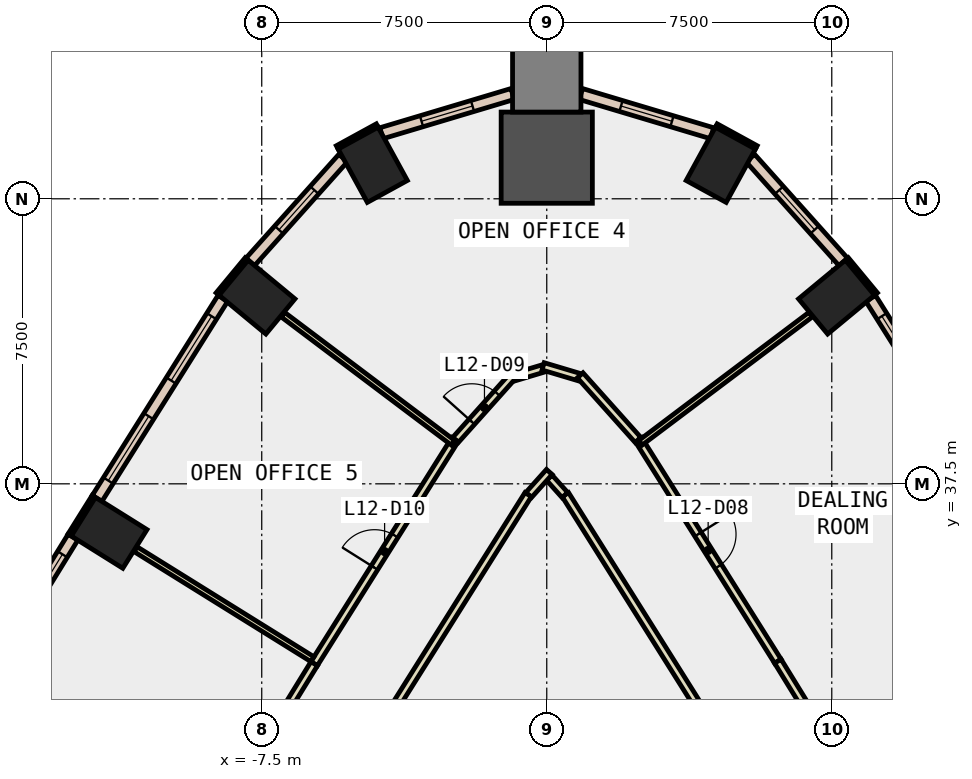
"""IFC4 building model, lengths in metres.
Left out: names, types, materials, properties, quantities, classifications, styles, units other than length and angle.
Written with IfcOpenShell. Run it as: python <this file> out.ifc"""

import sys

from ifc_helpers import new_model, si_unit, direction, frame, frame_2d, origin, origin_2d, place, context, subcontext, project, spatial, rectangle, extrude, element, fill, save


model = new_model("IFC4")
c1 = context("Model", 3, precision=1e-05, world=origin(), true_north=direction((0.0, 1.0)))
c2 = subcontext(c1, "Body", "Model", "MODEL_VIEW")
j1 = project(units=[si_unit("LENGTHUNIT", "METRE"), si_unit("PLANEANGLEUNIT", "RADIAN")], contexts=[c1])
p1 = place(None, origin())
s1 = spatial("IfcSite", under=j1, at=p1, CompositionType="ELEMENT")
p2 = place(p1, origin())
s2 = spatial("IfcBuilding", under=s1, at=p2, CompositionType="ELEMENT")
p3 = place(p2, frame((0.0, 0.0, 60.2)))
s3 = spatial("IfcBuildingStorey", under=s2, at=p3, CompositionType="ELEMENT", Elevation=60.2)
for number, where, z_axis, x_axis in (
    (1, (7.625, 42.414, -0.4), (0.0, 0.0, 1.0), (-0.638, 0.77, 0.0)),
    (2, (4.579, 45.895, -0.4), (0.0, 0.0, 1.0), (-0.877, 0.48, 0.0)),
):
    element("IfcColumn", number, at=place(p3, frame(where, z_axis=z_axis, x_axis=x_axis)), inside=s3, PredefinedType="COLUMN", context=c2, shape_type="SweptSolid", body=[
        extrude(rectangle(XDim=1.2, YDim=1.6, at=origin_2d()), origin(), (0.0, 0.0, 1.0), 4.2),
    ])
p4 = place(p3, frame((0.0, 46.082, -0.4), z_axis=(0.0, 0.0, 1.0), x_axis=(0.0, 1.0, 0.0)))
e3 = element("IfcColumn", 3, at=p4, inside=s3, PredefinedType="COLUMN", context=c2, shape_type="SweptSolid", body=[
    extrude(rectangle(XDim=2.4, YDim=2.4, at=origin_2d()), origin(), (0.0, 0.0, 1.0), 4.2),
])
for number, where, z_axis, x_axis in (
    (4, (-4.579, 45.895, -0.4), (0.0, 0.0, 1.0), (0.877, 0.48, 0.0)),
    (5, (-7.625, 42.414, -0.4), (0.0, 0.0, 1.0), (0.638, 0.77, 0.0)),
    (6, (-11.516, 36.211, -0.4), (0.0, 0.0, 1.0), (0.53, 0.848, 0.0)),
):
    element("IfcColumn", number, at=place(p3, frame(where, z_axis=z_axis, x_axis=x_axis)), inside=s3, PredefinedType="COLUMN", context=c2, shape_type="SweptSolid", body=[
        extrude(rectangle(XDim=1.2, YDim=1.6, at=origin_2d()), origin(), (0.0, 0.0, 1.0), 4.2),
    ])
p5 = place(p3, frame((0.0, 48.182, -0.4), z_axis=(0.0, 0.0, 1.0), x_axis=(0.0, 1.0, 0.0)))
e7 = element("IfcColumn", 7, at=p5, inside=s3, PredefinedType="COLUMN", context=c2, shape_type="SweptSolid", body=[
    extrude(rectangle(XDim=1.8, YDim=1.8, at=origin_2d()), origin(), (0.0, 0.0, 1.0), 4.2),
])
for number, where, z_axis, x_axis in (
    (8, (5.513, 46.352, 0.0), (0.0, 0.0, 1.0), (-0.877, 0.48, 0.0)),
    (9, (-4.461, 46.928, 0.0), (0.0, 0.0, 1.0), (-0.877, -0.48, 0.0)),
):
    element("IfcWall", number, at=place(p3, frame(where, z_axis=z_axis, x_axis=x_axis)), inside=s3, PredefinedType="STANDARD", context=c2, shape_type="SweptSolid", body=[
        extrude(rectangle(XDim=1.199, YDim=0.1, at=frame_2d((0.6, 0.0))), origin(), (0.0, 0.0, 1.0), 3.8),
    ])
for number, where, z_axis, x_axis in (
    (10, (8.662, 42.494, 0.0), (0.0, 0.0, 1.0), (-0.638, 0.77, 0.0)),
    (11, (-7.897, 43.418, 0.0), (0.0, 0.0, 1.0), (-0.638, -0.77, 0.0)),
):
    element("IfcWall", number, at=place(p3, frame(where, z_axis=z_axis, x_axis=x_axis)), inside=s3, PredefinedType="STANDARD", context=c2, shape_type="SweptSolid", body=[
        extrude(rectangle(XDim=1.2, YDim=0.1, at=frame_2d((0.6, 0.0))), origin(), (0.0, 0.0, 1.0), 3.8),
    ])
p6 = place(p3, frame((-11.919, 37.17, 0.0), z_axis=(0.0, 0.0, 1.0), x_axis=(-0.530273374944, -0.847826720401, 0.0)))
e12 = element("IfcWall", 12, at=p6, inside=s3, PredefinedType="STANDARD", context=c2, shape_type="SweptSolid", body=[
    extrude(rectangle(XDim=1.199, YDim=0.1, at=frame_2d((0.6, 0.0))), origin(), (0.0, 0.0, 1.0), 3.8),
])
p7 = place(p3, frame((11.833, 37.116, 0.0), z_axis=(0.0, 0.0, 1.0), x_axis=(-0.532322705893, 0.846541515102, 0.0)))
e13 = element("IfcWall", 13, at=p7, inside=s3, PredefinedType="STANDARD", context=c2, shape_type="SweptSolid", body=[
    extrude(rectangle(XDim=6.218, YDim=0.3, at=frame_2d((3.109, 0.0))), origin(), (0.0, 0.0, 1.0), 3.8),
])
p8 = place(p7, frame((0.555, 0.0, 0.9)))
e14 = element("IfcOpeningElement", 14, at=p8, cuts=e13, PredefinedType="OPENING", context=c2, shape_type="SweptSolid", body=[
    extrude(rectangle(XDim=2.0, YDim=2.6, at=frame_2d((1.0, 1.3))), frame((0.0, 0.16, 0.0), z_axis=(0.0, -1.0, 0.0), x_axis=(1.0, 0.0, 0.0)), (0.0, 0.0, 1.0), 0.32),
])
p9 = place(p7, frame((3.664, 0.0, 0.9)))
e15 = element("IfcOpeningElement", 15, at=p9, cuts=e13, PredefinedType="OPENING", context=c2, shape_type="SweptSolid", body=[
    extrude(rectangle(XDim=2.0, YDim=2.6, at=frame_2d((1.0, 1.3))), frame((0.0, 0.16, 0.0), z_axis=(0.0, -1.0, 0.0), x_axis=(1.0, 0.0, 0.0)), (0.0, 0.0, 1.0), 0.32),
])
p10 = place(p3, frame((7.803, 43.339, 0.0), z_axis=(0.0, 0.0, 1.0), x_axis=(-0.666901909312, 0.745145518242, 0.0)))
e16 = element("IfcWall", 16, at=p10, inside=s3, PredefinedType="STANDARD", context=c2, shape_type="SweptSolid", body=[
    extrude(rectangle(XDim=3.666, YDim=0.3, at=frame_2d((1.833, 0.0))), origin(), (0.0, 0.0, 1.0), 3.8),
])
p11 = place(p10, frame((1.133, 0.0, 0.9)))
e17 = element("IfcOpeningElement", 17, at=p11, cuts=e16, PredefinedType="OPENING", context=c2, shape_type="SweptSolid", body=[
    extrude(rectangle(XDim=1.4, YDim=2.6, at=frame_2d((0.7, 1.3))), frame((0.0, 0.16, 0.0), z_axis=(0.0, -1.0, 0.0), x_axis=(1.0, 0.0, 0.0)), (0.0, 0.0, 1.0), 0.32),
])
p12 = place(p3, frame((4.35, 46.725, 0.0), z_axis=(0.0, 0.0, 1.0), x_axis=(-0.958083325779, 0.286489687186, 0.0)))
e18 = element("IfcWall", 18, at=p12, inside=s3, PredefinedType="STANDARD", context=c2, shape_type="SweptSolid", body=[
    extrude(rectangle(XDim=3.602, YDim=0.3, at=frame_2d((1.801, 0.0))), origin(), (0.0, 0.0, 1.0), 3.8),
])
p13 = place(p12, frame((1.101, 0.0, 0.9)))
e19 = element("IfcOpeningElement", 19, at=p13, cuts=e18, PredefinedType="OPENING", context=c2, shape_type="SweptSolid", body=[
    extrude(rectangle(XDim=1.4, YDim=2.6, at=frame_2d((0.7, 1.3))), frame((0.0, 0.16, 0.0), z_axis=(0.0, -1.0, 0.0), x_axis=(1.0, 0.0, 0.0)), (0.0, 0.0, 1.0), 0.32),
])
p14 = place(p3, frame((-0.899, 47.757, 0.0), z_axis=(0.0, 0.0, 1.0), x_axis=(-0.958083325779, -0.286489687186, 0.0)))
e20 = element("IfcWall", 20, at=p14, inside=s3, PredefinedType="STANDARD", context=c2, shape_type="SweptSolid", body=[
    extrude(rectangle(XDim=3.602, YDim=0.3, at=frame_2d((1.801, 0.0))), origin(), (0.0, 0.0, 1.0), 3.8),
])
p15 = place(p14, frame((1.101, 0.0, 0.9)))
e21 = element("IfcOpeningElement", 21, at=p15, cuts=e20, PredefinedType="OPENING", context=c2, shape_type="SweptSolid", body=[
    extrude(rectangle(XDim=1.4, YDim=2.6, at=frame_2d((0.7, 1.3))), frame((0.0, 0.16, 0.0), z_axis=(0.0, -1.0, 0.0), x_axis=(1.0, 0.0, 0.0)), (0.0, 0.0, 1.0), 0.32),
])
p16 = place(p3, frame((-5.358, 46.071, 0.0), z_axis=(0.0, 0.0, 1.0), x_axis=(-0.666901909312, -0.745145518242, 0.0)))
e22 = element("IfcWall", 22, at=p16, inside=s3, PredefinedType="STANDARD", context=c2, shape_type="SweptSolid", body=[
    extrude(rectangle(XDim=3.666, YDim=0.3, at=frame_2d((1.833, 0.0))), origin(), (0.0, 0.0, 1.0), 3.8),
])
p17 = place(p16, frame((1.133, 0.0, 0.9)))
e23 = element("IfcOpeningElement", 23, at=p17, cuts=e22, PredefinedType="OPENING", context=c2, shape_type="SweptSolid", body=[
    extrude(rectangle(XDim=1.4, YDim=2.6, at=frame_2d((0.7, 1.3))), frame((0.0, 0.16, 0.0), z_axis=(0.0, -1.0, 0.0), x_axis=(1.0, 0.0, 0.0)), (0.0, 0.0, 1.0), 0.32),
])
p18 = place(p3, frame((-8.523, 42.38, 0.0), z_axis=(0.0, 0.0, 1.0), x_axis=(-0.532322705893, -0.846541515102, 0.0)))
e24 = element("IfcWall", 24, at=p18, inside=s3, PredefinedType="STANDARD", context=c2, shape_type="SweptSolid", body=[
    extrude(rectangle(XDim=6.218, YDim=0.3, at=frame_2d((3.109, 0.0))), origin(), (0.0, 0.0, 1.0), 3.8),
])
p19 = place(p18, frame((0.555, 0.0, 0.9)))
e25 = element("IfcOpeningElement", 25, at=p19, cuts=e24, PredefinedType="OPENING", context=c2, shape_type="SweptSolid", body=[
    extrude(rectangle(XDim=2.0, YDim=2.6, at=frame_2d((1.0, 1.3))), frame((0.0, 0.16, 0.0), z_axis=(0.0, -1.0, 0.0), x_axis=(1.0, 0.0, 0.0)), (0.0, 0.0, 1.0), 0.32),
])
p20 = place(p18, frame((3.664, 0.0, 0.9)))
e26 = element("IfcOpeningElement", 26, at=p20, cuts=e24, PredefinedType="OPENING", context=c2, shape_type="SweptSolid", body=[
    extrude(rectangle(XDim=2.0, YDim=2.6, at=frame_2d((1.0, 1.3))), frame((0.0, 0.16, 0.0), z_axis=(0.0, -1.0, 0.0), x_axis=(1.0, 0.0, 0.0)), (0.0, 0.0, 1.0), 0.32),
])
p21 = place(p3, frame((-12.466, 36.098, 0.0), z_axis=(0.0, 0.0, 1.0), x_axis=(-0.524239751329, -0.851570715282, 0.0)))
e27 = element("IfcWall", 27, at=p21, inside=s3, PredefinedType="STANDARD", context=c2, shape_type="SweptSolid", body=[
    extrude(rectangle(XDim=6.125, YDim=0.3, at=frame_2d((3.062, 0.0))), origin(), (0.0, 0.0, 1.0), 3.8),
])
p22 = place(p21, frame((0.531, 0.0, 0.9)))
e28 = element("IfcOpeningElement", 28, at=p22, cuts=e27, PredefinedType="OPENING", context=c2, shape_type="SweptSolid", body=[
    extrude(rectangle(XDim=2.0, YDim=2.6, at=frame_2d((1.0, 1.3))), frame((0.0, 0.16, 0.0), z_axis=(0.0, -1.0, 0.0), x_axis=(1.0, 0.0, 0.0)), (0.0, 0.0, 1.0), 0.32),
])
p23 = place(p21, frame((3.594, 0.0, 0.9)))
e29 = element("IfcOpeningElement", 29, at=p23, cuts=e27, PredefinedType="OPENING", context=c2, shape_type="SweptSolid", body=[
    extrude(rectangle(XDim=2.0, YDim=2.6, at=frame_2d((1.0, 1.3))), frame((0.0, 0.16, 0.0), z_axis=(0.0, -1.0, 0.0), x_axis=(1.0, 0.0, 0.0)), (0.0, 0.0, 1.0), 0.32),
])
p24 = place(p3, frame((4.043, 31.564, 0.0), z_axis=(0.0, 0.0, 1.0), x_axis=(-0.532301094997, 0.846555104092, 0.0)))
e30 = element("IfcWall", 30, at=p24, inside=s3, PredefinedType="PARTITIONING", context=c2, shape_type="SweptSolid", body=[
    extrude(rectangle(XDim=6.677, YDim=0.2, at=frame_2d((3.338, 0.0))), origin(), (0.0, 0.0, 1.0), 3.8),
])
p25 = place(p3, frame((0.476, 37.206, 0.0), z_axis=(0.0, 0.0, 1.0), x_axis=(-0.667027496744, 0.745033098988, 0.0)))
e31 = element("IfcWall", 31, at=p25, inside=s3, PredefinedType="PARTITIONING", context=c2, shape_type="SweptSolid", body=[
    extrude(rectangle(XDim=0.614, YDim=0.2, at=frame_2d((0.307, 0.0))), origin(), (0.0, 0.0, 1.0), 3.8),
])
p26 = place(p3, frame((0.067, 37.812, 0.0), z_axis=(0.0, 0.0, 1.0), x_axis=(-0.667338487106, -0.744754552606, 0.0)))
e32 = element("IfcWall", 32, at=p26, inside=s3, PredefinedType="PARTITIONING", context=c2, shape_type="SweptSolid", body=[
    extrude(rectangle(XDim=0.814, YDim=0.2, at=frame_2d((0.407, 0.0))), origin(), (0.0, 0.0, 1.0), 3.8),
])
p27 = place(p3, frame((-0.489, 37.216, 0.0), z_axis=(0.0, 0.0, 1.0), x_axis=(-0.532301094997, -0.846555104092, 0.0)))
e33 = element("IfcWall", 33, at=p27, inside=s3, PredefinedType="PARTITIONING", context=c2, shape_type="SweptSolid", body=[
    extrude(rectangle(XDim=6.677, YDim=0.2, at=frame_2d((3.338, 0.0))), origin(), (0.0, 0.0, 1.0), 3.8),
])
p28 = place(p3, frame((2.413, 38.665, 0.0), z_axis=(0.0, 0.0, 1.0), x_axis=(0.532328273879, -0.846538013812, 0.0)))
e34 = element("IfcWall", 34, at=p28, inside=s3, PredefinedType="PARTITIONING", context=c2, shape_type="SweptSolid", body=[
    extrude(rectangle(XDim=6.89, YDim=0.2, at=frame_2d((3.445, 0.0))), origin(), (0.0, 0.0, 1.0), 3.8),
])
p29 = place(p28, frame((2.945, 0.0, 0.0)))
e35 = element("IfcOpeningElement", 35, at=p29, cuts=e34, PredefinedType="OPENING", context=c2, shape_type="SweptSolid", body=[
    extrude(rectangle(XDim=1.0, YDim=2.1, at=frame_2d((0.5, 1.05))), frame((0.0, 0.11, 0.0), z_axis=(0.0, -1.0, 0.0), x_axis=(1.0, 0.0, 0.0)), (0.0, 0.0, 1.0), 0.22),
])
p30 = place(p3, frame((6.081, 32.832, 0.0), z_axis=(0.0, 0.0, 1.0), x_axis=(0.524062922014, -0.851679548756, 0.0)))
e36 = element("IfcWall", 36, at=p30, inside=s3, PredefinedType="PARTITIONING", context=c2, shape_type="SweptSolid", body=[
    extrude(rectangle(XDim=3.553, YDim=0.2, at=frame_2d((1.777, 0.0))), origin(), (0.0, 0.0, 1.0), 3.8),
])
p31 = place(p3, frame((-2.4, 38.655, 0.0), z_axis=(0.0, 0.0, 1.0), x_axis=(0.666791730919, 0.745244112743, 0.0)))
e37 = element("IfcWall", 37, at=p31, inside=s3, PredefinedType="PARTITIONING", context=c2, shape_type="SweptSolid", body=[
    extrude(rectangle(XDim=2.281, YDim=0.2, at=frame_2d((1.141, 0.0))), origin(), (0.0, 0.0, 1.0), 3.8),
])
p32 = place(p31, frame((0.641, 0.0, 0.0)))
e38 = element("IfcOpeningElement", 38, at=p32, cuts=e37, PredefinedType="OPENING", context=c2, shape_type="SweptSolid", body=[
    extrude(rectangle(XDim=1.0, YDim=2.1, at=frame_2d((0.5, 1.05))), frame((0.0, 0.11, 0.0), z_axis=(0.0, -1.0, 0.0), x_axis=(1.0, 0.0, 0.0)), (0.0, 0.0, 1.0), 0.22),
])
p33 = place(p3, frame((-0.849, 40.309, 0.0), z_axis=(0.0, 0.0, 1.0), x_axis=(0.958210118601, 0.286065322279, 0.0)))
e39 = element("IfcWall", 39, at=p33, inside=s3, PredefinedType="PARTITIONING", context=c2, shape_type="SweptSolid", body=[
    extrude(rectangle(XDim=0.786, YDim=0.2, at=frame_2d((0.393, 0.0))), origin(), (0.0, 0.0, 1.0), 3.8),
])
p34 = place(p3, frame((-0.096, 40.591, 0.0), z_axis=(0.0, 0.0, 1.0), x_axis=(0.958254449469, -0.285916788721, 0.0)))
e40 = element("IfcWall", 40, at=p34, inside=s3, PredefinedType="PARTITIONING", context=c2, shape_type="SweptSolid", body=[
    extrude(rectangle(XDim=0.986, YDim=0.2, at=frame_2d((0.493, 0.0))), origin(), (0.0, 0.0, 1.0), 3.8),
])
p35 = place(p3, frame((0.879, 40.355, 0.0), z_axis=(0.0, 0.0, 1.0), x_axis=(0.666791730919, -0.745244112743, 0.0)))
e41 = element("IfcWall", 41, at=p35, inside=s3, PredefinedType="PARTITIONING", context=c2, shape_type="SweptSolid", body=[
    extrude(rectangle(XDim=2.281, YDim=0.2, at=frame_2d((1.141, 0.0))), origin(), (0.0, 0.0, 1.0), 3.8),
])
p36 = place(p3, frame((-6.121, 32.768, 0.0), z_axis=(0.0, 0.0, 1.0), x_axis=(0.532309351336, 0.846549912574, 0.0)))
e42 = element("IfcWall", 42, at=p36, inside=s3, PredefinedType="PARTITIONING", context=c2, shape_type="SweptSolid", body=[
    extrude(rectangle(XDim=6.966, YDim=0.2, at=frame_2d((3.483, 0.0))), origin(), (0.0, 0.0, 1.0), 3.8),
])
p37 = place(p36, frame((2.983, 0.0, 0.0)))
e43 = element("IfcOpeningElement", 43, at=p37, cuts=e42, PredefinedType="OPENING", context=c2, shape_type="SweptSolid", body=[
    extrude(rectangle(XDim=1.0, YDim=2.1, at=frame_2d((0.5, 1.05))), frame((0.0, 0.11, 0.0), z_axis=(0.0, -1.0, 0.0), x_axis=(1.0, 0.0, 0.0)), (0.0, 0.0, 1.0), 0.22),
])
p38 = place(p3, frame((-9.884, 26.652, 0.0), z_axis=(0.0, 0.0, 1.0), x_axis=(0.524182788618, 0.851605779758, 0.0)))
e44 = element("IfcWall", 44, at=p38, inside=s3, PredefinedType="PARTITIONING", context=c2, shape_type="SweptSolid", body=[
    extrude(rectangle(XDim=7.18, YDim=0.2, at=frame_2d((3.59, 0.0))), origin(), (0.0, 0.0, 1.0), 3.8),
])
p39 = place(p3, frame((7.897, 29.69, 0.0), z_axis=(0.0, 0.0, 1.0), x_axis=(0.851604009471, 0.524185664677, 0.0)))
e45 = element("IfcWall", 45, at=p39, inside=s3, PredefinedType="PARTITIONING", context=c2, shape_type="SweptSolid", body=[
    extrude(rectangle(XDim=7.101, YDim=0.15, at=frame_2d((3.55, 0.0))), origin(), (0.0, 0.0, 1.0), 3.8),
])
for number, where, z_axis, x_axis in (
    (46, (2.466, 38.58, 0.0), (0.0, 0.0, 1.0), (0.799, 0.602, 0.0)),
    (47, (-2.466, 38.58, 0.0), (0.0, 0.0, 1.0), (-0.799, 0.602, 0.0)),
):
    element("IfcWall", number, at=place(p3, frame(where, z_axis=z_axis, x_axis=x_axis)), inside=s3, PredefinedType="PARTITIONING", context=c2, shape_type="SweptSolid", body=[
        extrude(rectangle(XDim=5.605, YDim=0.15, at=frame_2d((2.802, 0.0))), origin(), (0.0, 0.0, 1.0), 3.8),
    ])
p40 = place(p3, frame((-6.166, 32.885, 0.0), z_axis=(0.0, 0.0, 1.0), x_axis=(-0.84915518202, 0.528143424506, 0.0)))
e48 = element("IfcWall", 48, at=p40, inside=s3, PredefinedType="PARTITIONING", context=c2, shape_type="SweptSolid", body=[
    extrude(rectangle(XDim=5.48, YDim=0.15, at=frame_2d((2.74, 0.0))), origin(), (0.0, 0.0, 1.0), 3.8),
])
p41 = place(p9, origin())
e49 = element("IfcWindow", 49, at=p41, inside=s3, PartitioningType="SINGLE_PANEL", PredefinedType="WINDOW", context=c2, shape_type="SweptSolid", body=[
    extrude(rectangle(XDim=2.0, YDim=2.6, at=frame_2d((1.0, 1.3))), frame((0.0, 0.03, 0.0), z_axis=(0.0, -1.0, 0.0), x_axis=(1.0, 0.0, 0.0)), (0.0, 0.0, 1.0), 0.06),
])
fill(e15, e49)
p42 = place(p11, origin())
e50 = element("IfcWindow", 50, at=p42, inside=s3, PartitioningType="SINGLE_PANEL", PredefinedType="WINDOW", context=c2, shape_type="SweptSolid", body=[
    extrude(rectangle(XDim=1.4, YDim=2.6, at=frame_2d((0.7, 1.3))), frame((0.0, 0.03, 0.0), z_axis=(0.0, -1.0, 0.0), x_axis=(1.0, 0.0, 0.0)), (0.0, 0.0, 1.0), 0.06),
])
fill(e17, e50)
p43 = place(p13, origin())
e51 = element("IfcWindow", 51, at=p43, inside=s3, PartitioningType="SINGLE_PANEL", PredefinedType="WINDOW", context=c2, shape_type="SweptSolid", body=[
    extrude(rectangle(XDim=1.4, YDim=2.6, at=frame_2d((0.7, 1.3))), frame((0.0, 0.03, 0.0), z_axis=(0.0, -1.0, 0.0), x_axis=(1.0, 0.0, 0.0)), (0.0, 0.0, 1.0), 0.06),
])
fill(e19, e51)
p44 = place(p15, origin())
e52 = element("IfcWindow", 52, at=p44, inside=s3, PartitioningType="SINGLE_PANEL", PredefinedType="WINDOW", context=c2, shape_type="SweptSolid", body=[
    extrude(rectangle(XDim=1.4, YDim=2.6, at=frame_2d((0.7, 1.3))), frame((0.0, 0.03, 0.0), z_axis=(0.0, -1.0, 0.0), x_axis=(1.0, 0.0, 0.0)), (0.0, 0.0, 1.0), 0.06),
])
fill(e21, e52)
p45 = place(p17, origin())
e53 = element("IfcWindow", 53, at=p45, inside=s3, PartitioningType="SINGLE_PANEL", PredefinedType="WINDOW", context=c2, shape_type="SweptSolid", body=[
    extrude(rectangle(XDim=1.4, YDim=2.6, at=frame_2d((0.7, 1.3))), frame((0.0, 0.03, 0.0), z_axis=(0.0, -1.0, 0.0), x_axis=(1.0, 0.0, 0.0)), (0.0, 0.0, 1.0), 0.06),
])
fill(e23, e53)
p46 = place(p19, origin())
e54 = element("IfcWindow", 54, at=p46, inside=s3, PartitioningType="SINGLE_PANEL", PredefinedType="WINDOW", context=c2, shape_type="SweptSolid", body=[
    extrude(rectangle(XDim=2.0, YDim=2.6, at=frame_2d((1.0, 1.3))), frame((0.0, 0.03, 0.0), z_axis=(0.0, -1.0, 0.0), x_axis=(1.0, 0.0, 0.0)), (0.0, 0.0, 1.0), 0.06),
])
fill(e25, e54)
p47 = place(p20, origin())
e55 = element("IfcWindow", 55, at=p47, inside=s3, PartitioningType="SINGLE_PANEL", PredefinedType="WINDOW", context=c2, shape_type="SweptSolid", body=[
    extrude(rectangle(XDim=2.0, YDim=2.6, at=frame_2d((1.0, 1.3))), frame((0.0, 0.03, 0.0), z_axis=(0.0, -1.0, 0.0), x_axis=(1.0, 0.0, 0.0)), (0.0, 0.0, 1.0), 0.06),
])
fill(e26, e55)
p48 = place(p22, origin())
e56 = element("IfcWindow", 56, at=p48, inside=s3, PartitioningType="SINGLE_PANEL", PredefinedType="WINDOW", context=c2, shape_type="SweptSolid", body=[
    extrude(rectangle(XDim=2.0, YDim=2.6, at=frame_2d((1.0, 1.3))), frame((0.0, 0.03, 0.0), z_axis=(0.0, -1.0, 0.0), x_axis=(1.0, 0.0, 0.0)), (0.0, 0.0, 1.0), 0.06),
])
fill(e28, e56)
p49 = place(p29, origin())
e57 = element("IfcDoor", 57, at=p49, inside=s3, OperationType="SINGLE_SWING_LEFT", PredefinedType="DOOR", context=c2, shape_type="SweptSolid", body=[
    extrude(rectangle(XDim=1.0, YDim=2.1, at=frame_2d((0.5, 1.05))), frame((0.0, 0.025, 0.0), z_axis=(0.0, -1.0, 0.0), x_axis=(1.0, 0.0, 0.0)), (0.0, 0.0, 1.0), 0.05),
])
fill(e35, e57)
p50 = place(p32, origin())
e58 = element("IfcDoor", 58, at=p50, inside=s3, OperationType="SINGLE_SWING_LEFT", PredefinedType="DOOR", context=c2, shape_type="SweptSolid", body=[
    extrude(rectangle(XDim=1.0, YDim=2.1, at=frame_2d((0.5, 1.05))), frame((0.0, 0.025, 0.0), z_axis=(0.0, -1.0, 0.0), x_axis=(1.0, 0.0, 0.0)), (0.0, 0.0, 1.0), 0.05),
])
fill(e38, e58)
p51 = place(p37, origin())
e59 = element("IfcDoor", 59, at=p51, inside=s3, OperationType="SINGLE_SWING_LEFT", PredefinedType="DOOR", context=c2, shape_type="SweptSolid", body=[
    extrude(rectangle(XDim=1.0, YDim=2.1, at=frame_2d((0.5, 1.05))), frame((0.0, 0.025, 0.0), z_axis=(0.0, -1.0, 0.0), x_axis=(1.0, 0.0, 0.0)), (0.0, 0.0, 1.0), 0.05),
])
fill(e43, e59)
save(model, sys.argv[1])
